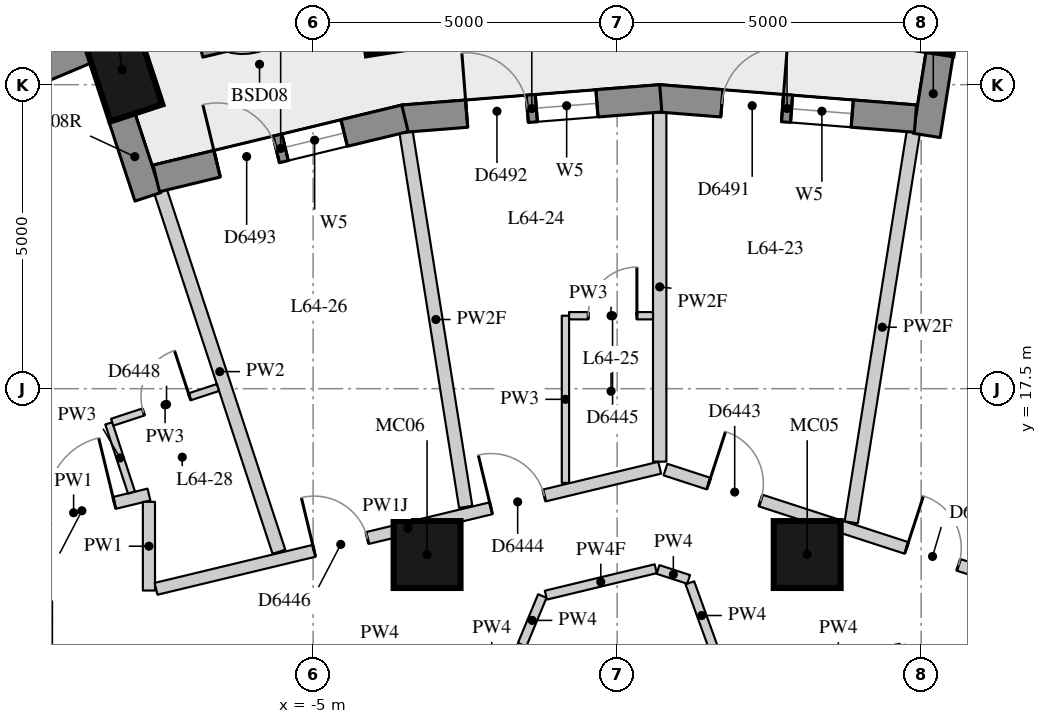
"""IFC4 building model, lengths in metres.
Left out: names, types, materials, properties, quantities, classifications, styles, units other than length and angle.
Written with IfcOpenShell. Run it as: python <this file> out.ifc"""

import sys

from ifc_helpers import new_model, si_unit, direction, frame, frame_2d, origin, origin_2d, place, context, subcontext, project, spatial, rectangle, extrude, element, fill, save


model = new_model("IFC4")
c1 = context("Model", 3, precision=1e-05, world=origin(), true_north=direction((0.0, 1.0)))
c2 = subcontext(c1, "Body", "Model", "MODEL_VIEW")
j1 = project(units=[si_unit("LENGTHUNIT", "METRE"), si_unit("PLANEANGLEUNIT", "RADIAN")], contexts=[c1])
p1 = place(None, origin())
s1 = spatial("IfcSite", under=j1, at=p1, CompositionType="ELEMENT")
p2 = place(p1, origin())
s2 = spatial("IfcBuilding", under=s1, at=p2, CompositionType="ELEMENT")
p3 = place(p2, frame((0.0, 0.0, 225.5)))
s3 = spatial("IfcBuildingStorey", under=s2, at=p3, CompositionType="ELEMENT", Elevation=225.5)
for number, where, z_axis, x_axis in (
    (1, (5.189, 23.797, 0.0), (0.0, 0.0, 1.0), (0.157, 0.988, 0.0)),
    (2, (-3.789, 23.797, 0.0), (0.0, 0.0, 1.0), (-0.157, 0.988, 0.0)),
    (3, (-8.141, 22.748, 0.0), (0.0, 0.0, 1.0), (-0.312, 0.95, 0.0)),
):
    element("IfcColumn", number, at=place(p3, frame(where, z_axis=z_axis, x_axis=x_axis)), inside=s3, PredefinedType="COLUMN", context=c2, shape_type="SweptSolid", body=[
        extrude(rectangle(XDim=1.5, YDim=0.9, at=origin_2d()), origin(), (0.0, 0.0, 1.0), 3.3),
    ])
for number, where, z_axis, x_axis in (
    (4, (3.126, 14.772, 0.0), (0.0, 0.0, 1.0), (1.0, 0.0, 0.0)),
    (5, (-3.126, 14.772, 0.0), (0.0, 0.0, 1.0), (1.0, 0.0, 0.0)),
):
    element("IfcColumn", number, at=place(p3, frame(where, z_axis=z_axis, x_axis=x_axis)), inside=s3, PredefinedType="COLUMN", context=c2, shape_type="SweptSolid", body=[
        extrude(rectangle(XDim=1.1, YDim=1.1, at=origin_2d()), origin(), (0.0, 0.0, 1.0), 3.3),
    ])
p4 = place(p3, frame((-8.703, 23.079, 0.0), z_axis=(0.0, 0.0, 1.0), x_axis=(-0.922168222612, -0.386789050006, 0.0)))
e6 = element("IfcWall", 6, at=p4, inside=s3, PredefinedType="SOLIDWALL", context=c2, shape_type="SweptSolid", body=[
    extrude(rectangle(XDim=3.651, YDim=0.45, at=frame_2d((1.825, 0.0))), origin(), (0.0, 0.0, 1.0), 2.85),
])
p5 = place(p4, frame((0.825, 0.0, 0.4)))
e7 = element("IfcOpeningElement", 7, at=p5, cuts=e6, PredefinedType="OPENING", context=c2, shape_type="SweptSolid", body=[
    extrude(rectangle(XDim=2.0, YDim=1.75, at=frame_2d((1.0, 0.875))), frame((0.0, 0.235, 0.0), z_axis=(0.0, -1.0, 0.0), x_axis=(1.0, 0.0, 0.0)), (0.0, 0.0, 1.0), 0.47),
])
p6 = place(p3, frame((5.309, 23.039, 0.0), z_axis=(0.0, 0.0, 1.0), x_axis=(-0.157189016474, -0.9875685359, 0.0)))
e8 = element("IfcWall", 8, at=p6, inside=s3, PredefinedType="SOLIDWALL", context=c2, shape_type="SweptSolid", body=[
    extrude(rectangle(XDim=1.39, YDim=0.45, at=frame_2d((0.695, 0.0))), origin(), (0.0, 0.0, 1.0), 2.3),
])
p7 = place(p3, frame((-8.15, 21.977, 0.0), z_axis=(0.0, 0.0, 1.0), x_axis=(0.312062715826, -0.950061504005, 0.0)))
e9 = element("IfcWall", 9, at=p7, inside=s3, PredefinedType="SOLIDWALL", context=c2, shape_type="SweptSolid", body=[
    extrude(rectangle(XDim=1.39, YDim=0.45, at=frame_2d((0.695, 0.0))), origin(), (0.0, 0.0, 1.0), 2.85),
])
p8 = place(p3, frame((4.906, 21.942, 0.0), z_axis=(0.0, 0.0, 1.0), x_axis=(-0.996902429846, 0.078648238166, 0.0)))
e10 = element("IfcWall", 10, at=p8, inside=s3, PredefinedType="SOLIDWALL", context=c2, shape_type="SweptSolid", body=[
    extrude(rectangle(XDim=4.237, YDim=0.45, at=frame_2d((2.119, 0.0))), origin(), (0.0, 0.0, 1.0), 2.85),
])
p9 = place(p8, frame((1.044, 0.0, 0.4)))
e11 = element("IfcOpeningElement", 11, at=p9, cuts=e10, PredefinedType="OPENING", context=c2, shape_type="SweptSolid", body=[
    extrude(rectangle(XDim=1.0, YDim=1.75, at=frame_2d((0.5, 0.875))), frame((0.0, 0.235, 0.0), z_axis=(0.0, -1.0, 0.0), x_axis=(1.0, 0.0, 0.0)), (0.0, 0.0, 1.0), 0.47),
])
p10 = place(p8, frame((2.194, 0.0, 0.0)))
e12 = element("IfcOpeningElement", 12, at=p10, cuts=e10, PredefinedType="OPENING", context=c2, shape_type="SweptSolid", body=[
    extrude(rectangle(XDim=1.0, YDim=2.15, at=frame_2d((0.5, 1.075))), frame((0.0, 0.235, 0.0), z_axis=(0.0, -1.0, 0.0), x_axis=(1.0, 0.0, 0.0)), (0.0, 0.0, 1.0), 0.47),
])
p11 = place(p3, frame((0.718, 22.276, 0.0), z_axis=(0.0, 0.0, 1.0), x_axis=(-0.996901346333, -0.078661970983, 0.0)))
e13 = element("IfcWall", 13, at=p11, inside=s3, PredefinedType="SOLIDWALL", context=c2, shape_type="SweptSolid", body=[
    extrude(rectangle(XDim=4.255, YDim=0.45, at=frame_2d((2.127, 0.0))), origin(), (0.0, 0.0, 1.0), 2.85),
])
p12 = place(p11, frame((1.052, 0.0, 0.4)))
e14 = element("IfcOpeningElement", 14, at=p12, cuts=e13, PredefinedType="OPENING", context=c2, shape_type="SweptSolid", body=[
    extrude(rectangle(XDim=1.0, YDim=1.75, at=frame_2d((0.5, 0.875))), frame((0.0, 0.235, 0.0), z_axis=(0.0, -1.0, 0.0), x_axis=(1.0, 0.0, 0.0)), (0.0, 0.0, 1.0), 0.47),
])
p13 = place(p11, frame((2.203, 0.0, 0.0)))
e15 = element("IfcOpeningElement", 15, at=p13, cuts=e13, PredefinedType="OPENING", context=c2, shape_type="SweptSolid", body=[
    extrude(rectangle(XDim=1.0, YDim=2.15, at=frame_2d((0.5, 1.075))), frame((0.0, 0.235, 0.0), z_axis=(0.0, -1.0, 0.0), x_axis=(1.0, 0.0, 0.0)), (0.0, 0.0, 1.0), 0.47),
])
p14 = place(p3, frame((-3.489, 21.947, 0.0), z_axis=(0.0, 0.0, 1.0), x_axis=(-0.972007311035, -0.234950606076, 0.0)))
e16 = element("IfcWall", 16, at=p14, inside=s3, PredefinedType="SOLIDWALL", context=c2, shape_type="SweptSolid", body=[
    extrude(rectangle(XDim=4.207, YDim=0.45, at=frame_2d((2.104, 0.0))), origin(), (0.0, 0.0, 1.0), 2.85),
])
p15 = place(p14, frame((1.029, 0.0, 0.4)))
e17 = element("IfcOpeningElement", 17, at=p15, cuts=e16, PredefinedType="OPENING", context=c2, shape_type="SweptSolid", body=[
    extrude(rectangle(XDim=1.0, YDim=1.75, at=frame_2d((0.5, 0.875))), frame((0.0, 0.235, 0.0), z_axis=(0.0, -1.0, 0.0), x_axis=(1.0, 0.0, 0.0)), (0.0, 0.0, 1.0), 0.47),
])
p16 = place(p14, frame((2.179, 0.0, 0.0)))
e18 = element("IfcOpeningElement", 18, at=p16, cuts=e16, PredefinedType="OPENING", context=c2, shape_type="SweptSolid", body=[
    extrude(rectangle(XDim=1.0, YDim=2.15, at=frame_2d((0.5, 1.075))), frame((0.0, 0.235, 0.0), z_axis=(0.0, -1.0, 0.0), x_axis=(1.0, 0.0, 0.0)), (0.0, 0.0, 1.0), 0.47),
])
p17 = place(p3, frame((-5.146, 23.714, 0.0), z_axis=(0.0, 0.0, 1.0), x_axis=(-0.972142986016, -0.234388597717, 0.0)))
e19 = element("IfcWall", 19, at=p17, inside=s3, PredefinedType="USERDEFINED", context=c2, shape_type="SweptSolid", body=[
    extrude(rectangle(XDim=1.8, YDim=0.7, at=frame_2d((0.9, 0.0))), origin(), (0.0, 0.0, 1.0), 0.75),
])
p18 = place(p3, frame((-10.177, 15.16, 0.0), z_axis=(0.0, 0.0, 1.0), x_axis=(0.971984190663, 0.235046236094, 0.0)))
e20 = element("IfcWall", 20, at=p18, inside=s3, PredefinedType="PARTITIONING", context=c2, shape_type="SweptSolid", body=[
    extrude(rectangle(XDim=2.549, YDim=0.2, at=frame_2d((1.274, 0.0))), origin(), (0.0, 0.0, 1.0), 2.85),
])
p19 = place(p18, frame((0.865, 0.0, 0.0)))
e21 = element("IfcOpeningElement", 21, at=p19, cuts=e20, PredefinedType="OPENING", context=c2, shape_type="SweptSolid", body=[
    extrude(rectangle(XDim=1.1, YDim=2.1, at=frame_2d((0.55, 1.05))), frame((0.0, 0.11, 0.0), z_axis=(0.0, -1.0, 0.0), x_axis=(1.0, 0.0, 0.0)), (0.0, 0.0, 1.0), 0.22),
])
p20 = place(p3, frame((-7.7, 15.639, 0.0), z_axis=(0.0, 0.0, 1.0), x_axis=(0.0, -1.0, 0.0)))
e22 = element("IfcWall", 22, at=p20, inside=s3, PredefinedType="PARTITIONING", context=c2, shape_type="SweptSolid", body=[
    extrude(rectangle(XDim=1.458, YDim=0.2, at=frame_2d((0.729, 0.0))), origin(), (0.0, 0.0, 1.0), 2.85),
])
p21 = place(p3, frame((-7.583, 14.208, 0.0), z_axis=(0.0, 0.0, 1.0), x_axis=(0.972284712223, 0.233799996531, 0.0)))
e23 = element("IfcWall", 23, at=p21, inside=s3, PredefinedType="PARTITIONING", context=c2, shape_type="SweptSolid", body=[
    extrude(rectangle(XDim=8.519, YDim=0.2, at=frame_2d((4.259, 0.0))), origin(), (0.0, 0.0, 1.0), 2.25),
])
p22 = place(p21, frame((5.667, 0.0, 0.0)))
e24 = element("IfcOpeningElement", 24, at=p22, cuts=e23, PredefinedType="OPENING", context=c2, shape_type="SweptSolid", body=[
    extrude(rectangle(XDim=0.9, YDim=2.1, at=frame_2d((0.45, 1.05))), frame((0.0, 0.11, 0.0), z_axis=(0.0, -1.0, 0.0), x_axis=(1.0, 0.0, 0.0)), (0.0, 0.0, 1.0), 0.22),
])
p23 = place(p21, frame((2.674, 0.0, 0.0)))
e25 = element("IfcOpeningElement", 25, at=p23, cuts=e23, PredefinedType="OPENING", context=c2, shape_type="SweptSolid", body=[
    extrude(rectangle(XDim=0.9, YDim=2.1, at=frame_2d((0.45, 1.05))), frame((0.0, 0.11, 0.0), z_axis=(0.0, -1.0, 0.0), x_axis=(1.0, 0.0, 0.0)), (0.0, 0.0, 1.0), 0.22),
])
p24 = place(p3, frame((0.795, 16.169, 0.0), z_axis=(0.0, 0.0, 1.0), x_axis=(0.950998491074, -0.309195520626, 0.0)))
e26 = element("IfcWall", 26, at=p24, inside=s3, PredefinedType="PARTITIONING", context=c2, shape_type="SweptSolid", body=[
    extrude(rectangle(XDim=12.357, YDim=0.2, at=frame_2d((6.179, 0.0))), origin(), (0.0, 0.0, 1.0), 2.85),
])
p25 = place(p24, frame((8.496, 0.0, 0.0)))
e27 = element("IfcOpeningElement", 27, at=p25, cuts=e26, PredefinedType="OPENING", context=c2, shape_type="SweptSolid", body=[
    extrude(rectangle(XDim=1.1, YDim=2.1, at=frame_2d((0.55, 1.05))), frame((0.0, 0.11, 0.0), z_axis=(0.0, -1.0, 0.0), x_axis=(1.0, 0.0, 0.0)), (0.0, 0.0, 1.0), 0.22),
])
p26 = place(p24, frame((4.169, 0.0, 0.0)))
e28 = element("IfcOpeningElement", 28, at=p26, cuts=e26, PredefinedType="OPENING", context=c2, shape_type="SweptSolid", body=[
    extrude(rectangle(XDim=0.9, YDim=2.1, at=frame_2d((0.45, 1.05))), frame((0.0, 0.11, 0.0), z_axis=(0.0, -1.0, 0.0), x_axis=(1.0, 0.0, 0.0)), (0.0, 0.0, 1.0), 0.22),
])
p27 = place(p24, frame((0.747, 0.0, 0.0)))
e29 = element("IfcOpeningElement", 29, at=p27, cuts=e26, PredefinedType="OPENING", context=c2, shape_type="SweptSolid", body=[
    extrude(rectangle(XDim=0.9, YDim=2.1, at=frame_2d((0.45, 1.05))), frame((0.0, 0.11, 0.0), z_axis=(0.0, -1.0, 0.0), x_axis=(1.0, 0.0, 0.0)), (0.0, 0.0, 1.0), 0.22),
])
p28 = place(p3, frame((-1.563, 13.288, 0.0), z_axis=(0.0, 0.0, 1.0), x_axis=(0.383038417634, 0.923732412886, 0.0)))
e30 = element("IfcWall", 30, at=p28, inside=s3, PredefinedType="PARTITIONING", context=c2, shape_type="SweptSolid", body=[
    extrude(rectangle(XDim=0.869, YDim=0.15, at=frame_2d((0.434, 0.0))), origin(), (0.0, 0.0, 1.0), 2.85),
])
p29 = place(p3, frame((-1.172, 14.104, 0.0), z_axis=(0.0, 0.0, 1.0), x_axis=(0.972260724841, 0.233899728371, 0.0)))
e31 = element("IfcWall", 31, at=p29, inside=s3, PredefinedType="PARTITIONING", context=c2, shape_type="SweptSolid", body=[
    extrude(rectangle(XDim=1.858, YDim=0.15, at=frame_2d((0.929, 0.0))), origin(), (0.0, 0.0, 1.0), 2.25),
])
p30 = place(p3, frame((0.673, 14.527, 0.0), z_axis=(0.0, 0.0, 1.0), x_axis=(0.950966196829, -0.309294831008, 0.0)))
e32 = element("IfcWall", 32, at=p30, inside=s3, PredefinedType="PARTITIONING", context=c2, shape_type="SweptSolid", body=[
    extrude(rectangle(XDim=0.529, YDim=0.15, at=frame_2d((0.264, 0.0))), origin(), (0.0, 0.0, 1.0), 2.85),
])
p31 = place(p3, frame((1.196, 14.307, 0.0), z_axis=(0.0, 0.0, 1.0), x_axis=(0.340730877952, -0.940160873899, 0.0)))
e33 = element("IfcWall", 33, at=p31, inside=s3, PredefinedType="PARTITIONING", context=c2, shape_type="SweptSolid", body=[
    extrude(rectangle(XDim=1.143, YDim=0.15, at=frame_2d((0.571, 0.0))), origin(), (0.0, 0.0, 1.0), 2.85),
])
p32 = place(p3, frame((4.871, 21.719, 0.0), z_axis=(0.0, 0.0, 1.0), x_axis=(-0.157114215968, -0.98758043882, 0.0)))
e34 = element("IfcWall", 34, at=p32, inside=s3, PredefinedType="PARTITIONING", context=c2, shape_type="SweptSolid", body=[
    extrude(rectangle(XDim=6.499, YDim=0.22, at=frame_2d((3.249, 0.0))), origin(), (0.0, 0.0, 1.0), 2.3),
])
p33 = place(p3, frame((0.7, 22.049, 0.0), z_axis=(0.0, 0.0, 1.0), x_axis=(0.0, -1.0, 0.0)))
e35 = element("IfcWall", 35, at=p33, inside=s3, PredefinedType="PARTITIONING", context=c2, shape_type="SweptSolid", body=[
    extrude(rectangle(XDim=5.749, YDim=0.22, at=frame_2d((2.874, 0.0))), origin(), (0.0, 0.0, 1.0), 2.3),
])
p34 = place(p3, frame((-3.471, 21.719, 0.0), z_axis=(0.0, 0.0, 1.0), x_axis=(0.157105510173, -0.987581823786, 0.0)))
e36 = element("IfcWall", 36, at=p34, inside=s3, PredefinedType="PARTITIONING", context=c2, shape_type="SweptSolid", body=[
    extrude(rectangle(XDim=6.241, YDim=0.22, at=frame_2d((3.12, 0.0))), origin(), (0.0, 0.0, 1.0), 2.3),
])
p35 = place(p3, frame((-7.508, 20.743, 0.0), z_axis=(0.0, 0.0, 1.0), x_axis=(0.311985211021, -0.95008695818, 0.0)))
e37 = element("IfcWall", 37, at=p35, inside=s3, PredefinedType="PARTITIONING", context=c2, shape_type="SweptSolid", body=[
    extrude(rectangle(XDim=6.237, YDim=0.22, at=frame_2d((3.118, 0.0))), origin(), (0.0, 0.0, 1.0), 2.85),
])
p36 = place(p3, frame((-0.85, 15.95, 0.0), z_axis=(0.0, 0.0, 1.0), x_axis=(0.0, 1.0, 0.0)))
e38 = element("IfcWall", 38, at=p36, inside=s3, PredefinedType="PARTITIONING", context=c2, shape_type="SweptSolid", body=[
    extrude(rectangle(XDim=2.75, YDim=0.12, at=frame_2d((1.375, 0.0))), origin(), (0.0, 0.0, 1.0), 2.85),
])
p37 = place(p3, frame((-7.987, 15.792, 0.0), z_axis=(0.0, 0.0, 1.0), x_axis=(-0.312187467963, 0.950020518119, 0.0)))
e39 = element("IfcWall", 39, at=p37, inside=s3, PredefinedType="PARTITIONING", context=c2, shape_type="SweptSolid", body=[
    extrude(rectangle(XDim=1.197, YDim=0.12, at=frame_2d((0.599, 0.0))), origin(), (0.0, 0.0, 1.0), 2.85),
])
p38 = place(p3, frame((-0.79, 18.7, 0.0), z_axis=(0.0, 0.0, 1.0), x_axis=(1.0, 0.0, 0.0)))
e40 = element("IfcWall", 40, at=p38, inside=s3, PredefinedType="PARTITIONING", context=c2, shape_type="SweptSolid", body=[
    extrude(rectangle(XDim=1.38, YDim=0.12, at=frame_2d((0.69, 0.0))), origin(), (0.0, 0.0, 1.0), 2.85),
])
p39 = place(p38, frame((0.315, 0.0, 0.0)))
e41 = element("IfcOpeningElement", 41, at=p39, cuts=e40, PredefinedType="OPENING", context=c2, shape_type="SweptSolid", body=[
    extrude(rectangle(XDim=0.8, YDim=2.1, at=frame_2d((0.4, 1.05))), frame((0.0, 0.07, 0.0), z_axis=(0.0, -1.0, 0.0), x_axis=(1.0, 0.0, 0.0)), (0.0, 0.0, 1.0), 0.14),
])
p40 = place(p3, frame((-8.304, 16.948, 0.0), z_axis=(0.0, 0.0, 1.0), x_axis=(0.95011423119, 0.311902144415, 0.0)))
e42 = element("IfcWall", 42, at=p40, inside=s3, PredefinedType="PARTITIONING", context=c2, shape_type="SweptSolid", body=[
    extrude(rectangle(XDim=1.83, YDim=0.12, at=frame_2d((0.915, 0.0))), origin(), (0.0, 0.0, 1.0), 2.85),
])
p41 = place(p40, frame((0.54, 0.0, 0.0)))
e43 = element("IfcOpeningElement", 43, at=p41, cuts=e42, PredefinedType="OPENING", context=c2, shape_type="SweptSolid", body=[
    extrude(rectangle(XDim=0.8, YDim=2.1, at=frame_2d((0.4, 1.05))), frame((0.0, 0.07, 0.0), z_axis=(0.0, -1.0, 0.0), x_axis=(1.0, 0.0, 0.0)), (0.0, 0.0, 1.0), 0.14),
])
p42 = place(p9, origin())
e44 = element("IfcWindow", 44, at=p42, inside=s3, PartitioningType="SINGLE_PANEL", PredefinedType="WINDOW", context=c2, shape_type="SweptSolid", body=[
    extrude(rectangle(XDim=1.0, YDim=1.75, at=frame_2d((0.5, 0.875))), frame((0.0, 0.035, 0.0), z_axis=(0.0, -1.0, 0.0), x_axis=(1.0, 0.0, 0.0)), (0.0, 0.0, 1.0), 0.06),
])
fill(e11, e44)
p43 = place(p10, frame((1.0, 0.0, 0.0), z_axis=(0.0, 0.0, 1.0), x_axis=(-1.0, 0.0, 0.0)))
e45 = element("IfcDoor", 45, at=p43, inside=s3, OperationType="SINGLE_SWING_RIGHT", PredefinedType="DOOR", context=c2, shape_type="SweptSolid", body=[
    extrude(rectangle(XDim=1.0, YDim=2.15, at=frame_2d((0.5, 1.075))), frame((0.0, 0.075, 0.0), z_axis=(0.0, -1.0, 0.0), x_axis=(1.0, 0.0, 0.0)), (0.0, 0.0, 1.0), 0.05),
])
fill(e12, e45)
p44 = place(p12, origin())
e46 = element("IfcWindow", 46, at=p44, inside=s3, PartitioningType="SINGLE_PANEL", PredefinedType="WINDOW", context=c2, shape_type="SweptSolid", body=[
    extrude(rectangle(XDim=1.0, YDim=1.75, at=frame_2d((0.5, 0.875))), frame((0.0, 0.035, 0.0), z_axis=(0.0, -1.0, 0.0), x_axis=(1.0, 0.0, 0.0)), (0.0, 0.0, 1.0), 0.06),
])
fill(e14, e46)
p45 = place(p13, frame((1.0, 0.0, 0.0), z_axis=(0.0, 0.0, 1.0), x_axis=(-1.0, 0.0, 0.0)))
e47 = element("IfcDoor", 47, at=p45, inside=s3, OperationType="SINGLE_SWING_LEFT", PredefinedType="DOOR", context=c2, shape_type="SweptSolid", body=[
    extrude(rectangle(XDim=1.0, YDim=2.15, at=frame_2d((0.5, 1.075))), frame((0.0, 0.075, 0.0), z_axis=(0.0, -1.0, 0.0), x_axis=(1.0, 0.0, 0.0)), (0.0, 0.0, 1.0), 0.05),
])
fill(e15, e47)
p46 = place(p15, origin())
e48 = element("IfcWindow", 48, at=p46, inside=s3, PartitioningType="SINGLE_PANEL", PredefinedType="WINDOW", context=c2, shape_type="SweptSolid", body=[
    extrude(rectangle(XDim=1.0, YDim=1.75, at=frame_2d((0.5, 0.875))), frame((0.0, 0.035, 0.0), z_axis=(0.0, -1.0, 0.0), x_axis=(1.0, 0.0, 0.0)), (0.0, 0.0, 1.0), 0.06),
])
fill(e17, e48)
p47 = place(p16, frame((1.0, 0.0, 0.0), z_axis=(0.0, 0.0, 1.0), x_axis=(-1.0, 0.0, 0.0)))
e49 = element("IfcDoor", 49, at=p47, inside=s3, OperationType="SINGLE_SWING_LEFT", PredefinedType="DOOR", context=c2, shape_type="SweptSolid", body=[
    extrude(rectangle(XDim=1.0, YDim=2.15, at=frame_2d((0.5, 1.075))), frame((0.0, 0.075, 0.0), z_axis=(0.0, -1.0, 0.0), x_axis=(1.0, 0.0, 0.0)), (0.0, 0.0, 1.0), 0.05),
])
fill(e18, e49)
p48 = place(p26, origin())
e50 = element("IfcDoor", 50, at=p48, inside=s3, OperationType="SINGLE_SWING_LEFT", PredefinedType="DOOR", context=c2, shape_type="SweptSolid", body=[
    extrude(rectangle(XDim=0.9, YDim=2.1, at=frame_2d((0.45, 1.05))), frame((0.0, 0.025, 0.0), z_axis=(0.0, -1.0, 0.0), x_axis=(1.0, 0.0, 0.0)), (0.0, 0.0, 1.0), 0.05),
])
fill(e28, e50)
p49 = place(p27, origin())
e51 = element("IfcDoor", 51, at=p49, inside=s3, OperationType="SINGLE_SWING_LEFT", PredefinedType="DOOR", context=c2, shape_type="SweptSolid", body=[
    extrude(rectangle(XDim=0.9, YDim=2.1, at=frame_2d((0.45, 1.05))), frame((0.0, 0.025, 0.0), z_axis=(0.0, -1.0, 0.0), x_axis=(1.0, 0.0, 0.0)), (0.0, 0.0, 1.0), 0.05),
])
fill(e29, e51)
p50 = place(p22, origin())
e52 = element("IfcDoor", 52, at=p50, inside=s3, OperationType="SINGLE_SWING_LEFT", PredefinedType="DOOR", context=c2, shape_type="SweptSolid", body=[
    extrude(rectangle(XDim=0.9, YDim=2.1, at=frame_2d((0.45, 1.05))), frame((0.0, 0.025, 0.0), z_axis=(0.0, -1.0, 0.0), x_axis=(1.0, 0.0, 0.0)), (0.0, 0.0, 1.0), 0.05),
])
fill(e24, e52)
p51 = place(p39, origin())
e53 = element("IfcDoor", 53, at=p51, inside=s3, OperationType="SINGLE_SWING_RIGHT", PredefinedType="DOOR", context=c2, shape_type="SweptSolid", body=[
    extrude(rectangle(XDim=0.8, YDim=2.1, at=frame_2d((0.4, 1.05))), frame((0.0, 0.025, 0.0), z_axis=(0.0, -1.0, 0.0), x_axis=(1.0, 0.0, 0.0)), (0.0, 0.0, 1.0), 0.05),
])
fill(e41, e53)
p52 = place(p23, origin())
e54 = element("IfcDoor", 54, at=p52, inside=s3, OperationType="SINGLE_SWING_LEFT", PredefinedType="DOOR", context=c2, shape_type="SweptSolid", body=[
    extrude(rectangle(XDim=0.9, YDim=2.1, at=frame_2d((0.45, 1.05))), frame((0.0, 0.025, 0.0), z_axis=(0.0, -1.0, 0.0), x_axis=(1.0, 0.0, 0.0)), (0.0, 0.0, 1.0), 0.05),
])
fill(e25, e54)
p53 = place(p19, origin())
e55 = element("IfcDoor", 55, at=p53, inside=s3, OperationType="SINGLE_SWING_RIGHT", PredefinedType="DOOR", context=c2, shape_type="SweptSolid", body=[
    extrude(rectangle(XDim=1.1, YDim=2.1, at=frame_2d((0.55, 1.05))), frame((0.0, 0.025, 0.0), z_axis=(0.0, -1.0, 0.0), x_axis=(1.0, 0.0, 0.0)), (0.0, 0.0, 1.0), 0.05),
])
fill(e21, e55)
p54 = place(p41, origin())
e56 = element("IfcDoor", 56, at=p54, inside=s3, OperationType="SINGLE_SWING_RIGHT", PredefinedType="DOOR", context=c2, shape_type="SweptSolid", body=[
    extrude(rectangle(XDim=0.8, YDim=2.1, at=frame_2d((0.4, 1.05))), frame((0.0, 0.025, 0.0), z_axis=(0.0, -1.0, 0.0), x_axis=(1.0, 0.0, 0.0)), (0.0, 0.0, 1.0), 0.05),
])
fill(e43, e56)
save(model, sys.argv[1])
